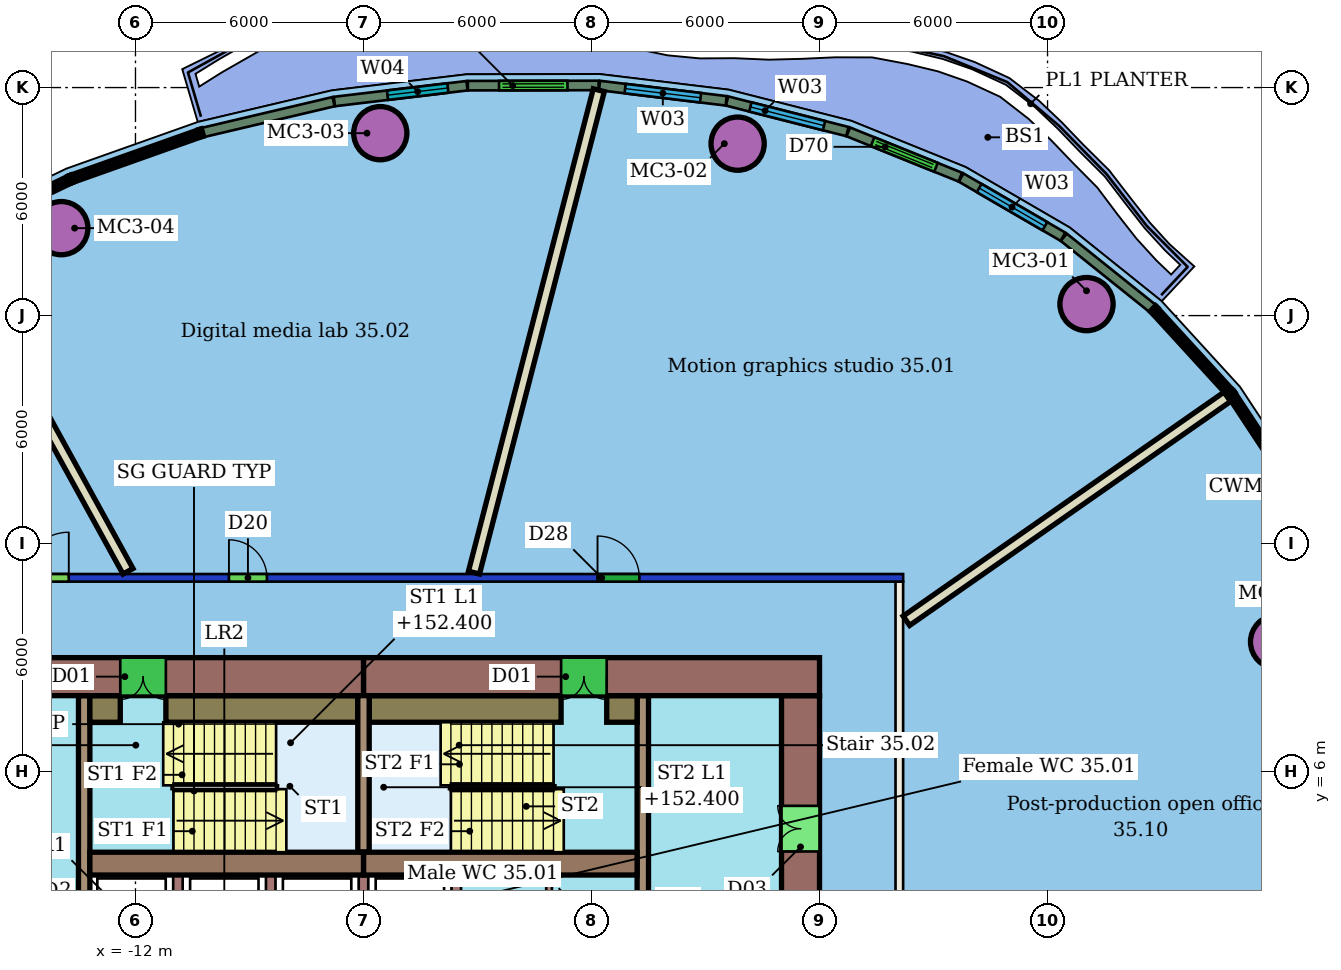
"""IFC4 building model, lengths in metres.
Left out: names, types, materials, properties, quantities, classifications, styles, units other than length and angle.
Written with IfcOpenShell. Run it as: python <this file> out.ifc"""

import sys

from ifc_helpers import new_model, si_unit, direction, frame, frame_2d, origin, origin_2d, place, context, subcontext, project, spatial, rectangle, hollow_circle, extrude, element, fill, save


model = new_model("IFC4")
c1 = context("Model", 3, precision=1e-05, world=origin(), true_north=direction((0.0, 1.0)))
c2 = subcontext(c1, "Body", "Model", "MODEL_VIEW")
j1 = project(units=[si_unit("LENGTHUNIT", "METRE"), si_unit("PLANEANGLEUNIT", "RADIAN")], contexts=[c1])
p1 = place(None, origin())
s1 = spatial("IfcSite", under=j1, at=p1, CompositionType="ELEMENT")
p2 = place(p1, origin())
s2 = spatial("IfcBuilding", under=s1, at=p2, CompositionType="ELEMENT")
p3 = place(p2, frame((0.0, 0.0, 150.6)))
s3 = spatial("IfcBuildingStorey", under=s2, at=p3, CompositionType="ELEMENT", Elevation=150.6)
for number, where, z_axis, x_axis in (
    (1, (13.026, 18.303, 0.0), (0.0, 0.0, 1.0), (1.0, 0.0, 0.0)),
    (2, (3.845, 22.524, 0.0), (0.0, 0.0, 1.0), (1.0, 0.0, 0.0)),
    (3, (-5.558, 22.8, 0.0), (0.0, 0.0, 1.0), (1.0, 0.0, 0.0)),
    (4, (-13.952, 20.301, 0.0), (0.0, 0.0, 1.0), (1.0, 0.0, 0.0)),
    (5, (18.041, 9.417, 0.0), (0.0, 0.0, 1.0), (1.0, 0.0, 0.0)),
):
    element("IfcColumn", number, at=place(p3, frame(where, z_axis=z_axis, x_axis=x_axis)), inside=s3, PredefinedType="COLUMN", context=c2, shape_type="SweptSolid", body=[
        extrude(hollow_circle(Radius=0.7, WallThickness=0.05, at=origin_2d()), origin(), (0.0, 0.0, 1.0), 3.45),
    ])
p4 = place(p3, frame((-20.2, 11.1, 0.0), z_axis=(0.0, 0.0, 1.0), x_axis=(1.0, 0.0, 0.0)))
e6 = element("IfcWall", 6, at=p4, inside=s3, PredefinedType="PARTITIONING", context=c2, shape_type="SweptSolid", body=[
    extrude(rectangle(XDim=28.4, YDim=0.2, at=frame_2d((14.2, 0.0))), origin(), (0.0, 0.0, 1.0), 3.05),
])
p5 = place(p4, frame((20.358, 0.0, 0.0)))
e7 = element("IfcOpeningElement", 7, at=p5, cuts=e6, PredefinedType="OPENING", context=c2, shape_type="SweptSolid", body=[
    extrude(rectangle(XDim=1.1, YDim=2.1, at=frame_2d((0.55, 1.05))), frame((0.0, 0.11, 0.0), z_axis=(0.0, -1.0, 0.0), x_axis=(1.0, 0.0, 0.0)), (0.0, 0.0, 1.0), 0.22),
])
p6 = place(p4, frame((10.659, 0.0, 0.0)))
e8 = element("IfcOpeningElement", 8, at=p6, cuts=e6, PredefinedType="OPENING", context=c2, shape_type="SweptSolid", body=[
    extrude(rectangle(XDim=1.0, YDim=2.1, at=frame_2d((0.5, 1.05))), frame((0.0, 0.11, 0.0), z_axis=(0.0, -1.0, 0.0), x_axis=(1.0, 0.0, 0.0)), (0.0, 0.0, 1.0), 0.22),
])
p7 = place(p4, frame((5.245, 0.0, 0.0)))
e9 = element("IfcOpeningElement", 9, at=p7, cuts=e6, PredefinedType="OPENING", context=c2, shape_type="SweptSolid", body=[
    extrude(rectangle(XDim=1.2, YDim=2.1, at=frame_2d((0.6, 1.05))), frame((0.0, 0.11, 0.0), z_axis=(0.0, -1.0, 0.0), x_axis=(1.0, 0.0, 0.0)), (0.0, 0.0, 1.0), 0.22),
])
p8 = place(p3, frame((8.1, 11.0, 0.0), z_axis=(0.0, 0.0, 1.0), x_axis=(0.0, -1.0, 0.0)))
e10 = element("IfcWall", 10, at=p8, inside=s3, PredefinedType="PARTITIONING", context=c2, shape_type="SweptSolid", body=[
    extrude(rectangle(XDim=22.0, YDim=0.2, at=frame_2d((11.0, 0.0))), origin(), (0.0, 0.0, 1.0), 3.45),
])
p9 = place(p8, frame((16.014, 0.0, 0.0)))
e11 = element("IfcOpeningElement", 11, at=p9, cuts=e10, PredefinedType="OPENING", context=c2, shape_type="SweptSolid", body=[
    extrude(rectangle(XDim=1.2, YDim=2.1, at=frame_2d((0.6, 1.05))), frame((0.0, 0.11, 0.0), z_axis=(0.0, -1.0, 0.0), x_axis=(1.0, 0.0, 0.0)), (0.0, 0.0, 1.0), 0.22),
])
p10 = place(p8, frame((8.381, 0.0, 0.0)))
e12 = element("IfcOpeningElement", 12, at=p10, cuts=e10, PredefinedType="OPENING", context=c2, shape_type="SweptSolid", body=[
    extrude(rectangle(XDim=1.8, YDim=2.1, at=frame_2d((0.9, 1.05))), frame((0.0, 0.11, 0.0), z_axis=(0.0, -1.0, 0.0), x_axis=(1.0, 0.0, 0.0)), (0.0, 0.0, 1.0), 0.22),
])
p11 = place(p3, frame((16.731, 15.864, 0.0), z_axis=(0.0, 0.0, 1.0), x_axis=(-0.820033028479, -0.572316199494, 0.0)))
e13 = element("IfcWall", 13, at=p11, inside=s3, PredefinedType="PARTITIONING", context=c2, shape_type="SweptSolid", body=[
    extrude(rectangle(XDim=10.298, YDim=0.3, at=frame_2d((5.149, 0.0))), origin(), (0.0, 0.0, 1.0), 3.45),
])
p12 = place(p3, frame((0.192, 23.931, 0.0), z_axis=(0.0, 0.0, 1.0), x_axis=(-0.25047941352, -0.968121925897, 0.0)))
e14 = element("IfcWall", 14, at=p12, inside=s3, PredefinedType="PARTITIONING", context=c2, shape_type="SweptSolid", body=[
    extrude(rectangle(XDim=13.112, YDim=0.3, at=frame_2d((6.556, 0.0))), origin(), (0.0, 0.0, 1.0), 3.45),
])
p13 = place(p3, frame((-16.937, 19.894, 0.0), z_axis=(0.0, 0.0, 1.0), x_axis=(0.48175299215, -0.87630705495, 0.0)))
e15 = element("IfcWall", 15, at=p13, inside=s3, PredefinedType="PARTITIONING", context=c2, shape_type="SweptSolid", body=[
    extrude(rectangle(XDim=9.839, YDim=0.3, at=frame_2d((4.919, 0.0))), origin(), (0.0, 0.0, 1.0), 3.45),
])
p14 = place(p3, frame((14.758, 18.194, 0.0), z_axis=(0.0, 0.0, 1.0), x_axis=(-0.780485864534, 0.625173428148, 0.0)))
e16 = element("IfcWall", 16, at=p14, inside=s3, PredefinedType="SOLIDWALL", context=c2, shape_type="SweptSolid", body=[
    extrude(rectangle(XDim=2.987, YDim=0.25, at=frame_2d((1.493, 0.0))), origin(), (0.0, 0.0, 1.0), 3.1),
])
p15 = place(p3, frame((12.405, 20.076, 0.0), z_axis=(0.0, 0.0, 1.0), x_axis=(-0.864615512978, 0.502434089925, 0.0)))
e17 = element("IfcWall", 17, at=p15, inside=s3, PredefinedType="SOLIDWALL", context=c2, shape_type="SweptSolid", body=[
    extrude(rectangle(XDim=3.097, YDim=0.25, at=frame_2d((1.548, 0.0))), origin(), (0.0, 0.0, 1.0), 3.1),
])
p16 = place(p15, frame((0.548, 0.0, 0.9)))
e18 = element("IfcOpeningElement", 18, at=p16, cuts=e17, PredefinedType="OPENING", context=c2, shape_type="SweptSolid", body=[
    extrude(rectangle(XDim=2.0, YDim=2.1, at=frame_2d((1.0, 1.05))), frame((0.0, 0.135, 0.0), z_axis=(0.0, -1.0, 0.0), x_axis=(1.0, 0.0, 0.0)), (0.0, 0.0, 1.0), 0.27),
])
p17 = place(p3, frame((9.704, 21.643, 0.0), z_axis=(0.0, 0.0, 1.0), x_axis=(-0.927146406079, 0.374699268339, 0.0)))
e19 = element("IfcWall", 19, at=p17, inside=s3, PredefinedType="SOLIDWALL", context=c2, shape_type="SweptSolid", body=[
    extrude(rectangle(XDim=3.178, YDim=0.25, at=frame_2d((1.589, 0.0))), origin(), (0.0, 0.0, 1.0), 3.1),
])
p18 = place(p17, frame((0.689, 0.0, 0.0)))
e20 = element("IfcOpeningElement", 20, at=p18, cuts=e19, PredefinedType="OPENING", context=c2, shape_type="SweptSolid", body=[
    extrude(rectangle(XDim=1.8, YDim=2.4, at=frame_2d((0.9, 1.2))), frame((0.0, 0.135, 0.0), z_axis=(0.0, -1.0, 0.0), x_axis=(1.0, 0.0, 0.0)), (0.0, 0.0, 1.0), 0.27),
])
p19 = place(p3, frame((6.733, 22.842, 0.0), z_axis=(0.0, 0.0, 1.0), x_axis=(-0.969199069112, 0.246278631701, 0.0)))
e21 = element("IfcWall", 21, at=p19, inside=s3, PredefinedType="SOLIDWALL", context=c2, shape_type="SweptSolid", body=[
    extrude(rectangle(XDim=3.267, YDim=0.25, at=frame_2d((1.634, 0.0))), origin(), (0.0, 0.0, 1.0), 3.1),
])
p20 = place(p19, frame((0.634, 0.0, 0.9)))
e22 = element("IfcOpeningElement", 22, at=p20, cuts=e21, PredefinedType="OPENING", context=c2, shape_type="SweptSolid", body=[
    extrude(rectangle(XDim=2.0, YDim=2.1, at=frame_2d((1.0, 1.05))), frame((0.0, 0.135, 0.0), z_axis=(0.0, -1.0, 0.0), x_axis=(1.0, 0.0, 0.0)), (0.0, 0.0, 1.0), 0.27),
])
p21 = place(p3, frame((3.543, 23.651, 0.0), z_axis=(0.0, 0.0, 1.0), x_axis=(-0.992754830244, 0.120157592466, 0.0)))
e23 = element("IfcWall", 23, at=p21, inside=s3, PredefinedType="SOLIDWALL", context=c2, shape_type="SweptSolid", body=[
    extrude(rectangle(XDim=3.357, YDim=0.25, at=frame_2d((1.678, 0.0))), origin(), (0.0, 0.0, 1.0), 3.1),
])
p22 = place(p21, frame((0.678, 0.0, 0.9)))
e24 = element("IfcOpeningElement", 24, at=p22, cuts=e23, PredefinedType="OPENING", context=c2, shape_type="SweptSolid", body=[
    extrude(rectangle(XDim=2.0, YDim=2.1, at=frame_2d((1.0, 1.05))), frame((0.0, 0.135, 0.0), z_axis=(0.0, -1.0, 0.0), x_axis=(1.0, 0.0, 0.0)), (0.0, 0.0, 1.0), 0.27),
])
p23 = place(p3, frame((0.187, 24.056, 0.0), z_axis=(0.0, 0.0, 1.0), x_axis=(-0.999998549944, -0.001702970638, 0.0)))
e25 = element("IfcWall", 25, at=p23, inside=s3, PredefinedType="SOLIDWALL", context=c2, shape_type="SweptSolid", body=[
    extrude(rectangle(XDim=3.441, YDim=0.25, at=frame_2d((1.72, 0.0))), origin(), (0.0, 0.0, 1.0), 3.1),
])
p24 = place(p23, frame((0.82, 0.0, 0.0)))
e26 = element("IfcOpeningElement", 26, at=p24, cuts=e25, PredefinedType="OPENING", context=c2, shape_type="SweptSolid", body=[
    extrude(rectangle(XDim=1.8, YDim=2.4, at=frame_2d((0.9, 1.2))), frame((0.0, 0.135, 0.0), z_axis=(0.0, -1.0, 0.0), x_axis=(1.0, 0.0, 0.0)), (0.0, 0.0, 1.0), 0.27),
])
p25 = place(p3, frame((-3.276, 24.049, 0.0), z_axis=(0.0, 0.0, 1.0), x_axis=(-0.992969234445, -0.11837271411, 0.0)))
e27 = element("IfcWall", 27, at=p25, inside=s3, PredefinedType="SOLIDWALL", context=c2, shape_type="SweptSolid", body=[
    extrude(rectangle(XDim=3.514, YDim=0.25, at=frame_2d((1.757, 0.0))), origin(), (0.0, 0.0, 1.0), 3.1),
])
p26 = place(p25, frame((0.507, 0.0, 0.9)))
e28 = element("IfcOpeningElement", 28, at=p26, cuts=e27, PredefinedType="OPENING", context=c2, shape_type="SweptSolid", body=[
    extrude(rectangle(XDim=1.6, YDim=2.1, at=frame_2d((0.8, 1.05))), frame((0.0, 0.135, 0.0), z_axis=(0.0, -1.0, 0.0), x_axis=(1.0, 0.0, 0.0)), (0.0, 0.0, 1.0), 0.27),
])
p27 = place(p3, frame((-6.787, 23.629, 0.0), z_axis=(0.0, 0.0, 1.0), x_axis=(-0.973349080419, -0.229328514683, 0.0)))
e29 = element("IfcWall", 29, at=p27, inside=s3, PredefinedType="SOLIDWALL", context=c2, shape_type="SweptSolid", body=[
    extrude(rectangle(XDim=3.529, YDim=0.25, at=frame_2d((1.765, 0.0))), origin(), (0.0, 0.0, 1.0), 3.1),
])
p28 = place(p3, frame((6.0, 8.5, 0.0), z_axis=(0.0, 0.0, 1.0), x_axis=(-1.0, 0.0, 0.0)))
e30 = element("IfcWall", 30, at=p28, inside=s3, PredefinedType="SHEAR", context=c2, shape_type="SweptSolid", body=[
    extrude(rectangle(XDim=12.0, YDim=1.0, at=frame_2d((6.0, 0.0))), origin(), (0.0, 0.0, 1.0), 3.3),
])
p29 = place(p28, frame((5.6, 0.0, 0.0)))
e31 = element("IfcOpeningElement", 31, at=p29, cuts=e30, PredefinedType="OPENING", context=c2, shape_type="SweptSolid", body=[
    extrude(rectangle(XDim=1.2, YDim=2.1, at=frame_2d((0.6, 1.05))), frame((0.0, 0.51, 0.0), z_axis=(0.0, -1.0, 0.0), x_axis=(1.0, 0.0, 0.0)), (0.0, 0.0, 1.0), 1.02),
])
p30 = place(p3, frame((-6.0, 8.5, 0.0), z_axis=(0.0, 0.0, 1.0), x_axis=(-1.0, 0.0, 0.0)))
e32 = element("IfcWall", 32, at=p30, inside=s3, PredefinedType="SHEAR", context=c2, shape_type="SweptSolid", body=[
    extrude(rectangle(XDim=12.0, YDim=1.0, at=frame_2d((6.0, 0.0))), origin(), (0.0, 0.0, 1.0), 3.3),
])
p31 = place(p30, frame((5.2, 0.0, 0.0)))
e33 = element("IfcOpeningElement", 33, at=p31, cuts=e32, PredefinedType="OPENING", context=c2, shape_type="SweptSolid", body=[
    extrude(rectangle(XDim=1.2, YDim=2.1, at=frame_2d((0.6, 1.05))), frame((0.0, 0.51, 0.0), z_axis=(0.0, -1.0, 0.0), x_axis=(1.0, 0.0, 0.0)), (0.0, 0.0, 1.0), 1.02),
])
p32 = place(p3, frame((5.5, -8.0, 0.0), z_axis=(0.0, 0.0, 1.0), x_axis=(0.0, 1.0, 0.0)))
e34 = element("IfcWall", 34, at=p32, inside=s3, PredefinedType="SHEAR", context=c2, shape_type="SweptSolid", body=[
    extrude(rectangle(XDim=16.0, YDim=1.0, at=frame_2d((8.0, 0.0))), origin(), (0.0, 0.0, 1.0), 3.3),
])
p33 = place(p32, frame((2.9, 0.0, 0.0)))
e35 = element("IfcOpeningElement", 35, at=p33, cuts=e34, PredefinedType="OPENING", context=c2, shape_type="SweptSolid", body=[
    extrude(rectangle(XDim=1.2, YDim=2.1, at=frame_2d((0.6, 1.05))), frame((0.0, 0.51, 0.0), z_axis=(0.0, -1.0, 0.0), x_axis=(1.0, 0.0, 0.0)), (0.0, 0.0, 1.0), 1.02),
])
p34 = place(p32, frame((11.9, 0.0, 0.0)))
e36 = element("IfcOpeningElement", 36, at=p34, cuts=e34, PredefinedType="OPENING", context=c2, shape_type="SweptSolid", body=[
    extrude(rectangle(XDim=1.2, YDim=2.1, at=frame_2d((0.6, 1.05))), frame((0.0, 0.51, 0.0), z_axis=(0.0, -1.0, 0.0), x_axis=(1.0, 0.0, 0.0)), (0.0, 0.0, 1.0), 1.02),
])
for number, where, z_axis, x_axis in (
    (37, (-13.2, 3.58, 0.0), (0.0, 0.0, 1.0), (1.0, 0.0, 0.0)),
    (38, (-6.0, 3.58, 0.0), (0.0, 0.0, 1.0), (1.0, 0.0, 0.0)),
):
    element("IfcWall", number, at=place(p3, frame(where, z_axis=z_axis, x_axis=x_axis)), inside=s3, PredefinedType="SHEAR", context=c2, shape_type="SweptSolid", body=[
        extrude(rectangle(XDim=7.2, YDim=0.6, at=frame_2d((3.6, 0.0))), origin(), (0.0, 0.0, 1.0), 3.3),
    ])
p35 = place(p3, frame((-13.35, 8.0, 0.0), z_axis=(0.0, 0.0, 1.0), x_axis=(0.0, -1.0, 0.0)))
e39 = element("IfcWall", 39, at=p35, inside=s3, PredefinedType="SHEAR", context=c2, shape_type="SweptSolid", body=[
    extrude(rectangle(XDim=16.0, YDim=0.3, at=frame_2d((8.0, 0.0))), origin(), (0.0, 0.0, 1.0), 3.3),
])
p36 = place(p35, frame((7.25, 0.0, 0.0)))
e40 = element("IfcOpeningElement", 40, at=p36, cuts=e39, PredefinedType="OPENING", context=c2, shape_type="SweptSolid", body=[
    extrude(rectangle(XDim=1.5, YDim=2.1, at=frame_2d((0.75, 1.05))), frame((0.0, 0.16, 0.0), z_axis=(0.0, -1.0, 0.0), x_axis=(1.0, 0.0, 0.0)), (0.0, 0.0, 1.0), 0.32),
])
p37 = place(p3, frame((1.35, -8.0, 0.0), z_axis=(0.0, 0.0, 1.0), x_axis=(0.0, 1.0, 0.0)))
e41 = element("IfcWall", 41, at=p37, inside=s3, PredefinedType="SHEAR", context=c2, shape_type="SweptSolid", body=[
    extrude(rectangle(XDim=16.0, YDim=0.3, at=frame_2d((8.0, 0.0))), origin(), (0.0, 0.0, 1.0), 3.3),
])
p38 = place(p37, frame((1.91, 0.0, 0.0)))
e42 = element("IfcOpeningElement", 42, at=p38, cuts=e41, PredefinedType="OPENING", context=c2, shape_type="SweptSolid", body=[
    extrude(rectangle(XDim=1.0, YDim=2.1, at=frame_2d((0.5, 1.05))), frame((0.0, 0.16, 0.0), z_axis=(0.0, -1.0, 0.0), x_axis=(1.0, 0.0, 0.0)), (0.0, 0.0, 1.0), 0.32),
])
p39 = place(p37, frame((7.25, 0.0, 0.0)))
e43 = element("IfcOpeningElement", 43, at=p39, cuts=e41, PredefinedType="OPENING", context=c2, shape_type="SweptSolid", body=[
    extrude(rectangle(XDim=1.5, YDim=2.1, at=frame_2d((0.75, 1.05))), frame((0.0, 0.16, 0.0), z_axis=(0.0, -1.0, 0.0), x_axis=(1.0, 0.0, 0.0)), (0.0, 0.0, 1.0), 0.32),
])
p40 = place(p3, frame((-6.0, 3.88, 0.0), z_axis=(0.0, 0.0, 1.0), x_axis=(0.0, 1.0, 0.0)))
e44 = element("IfcWall", 44, at=p40, inside=s3, PredefinedType="SHEAR", context=c2, shape_type="SweptSolid", body=[
    extrude(rectangle(XDim=4.12, YDim=0.3, at=frame_2d((2.06, 0.0))), origin(), (0.0, 0.0, 1.0), 3.3),
])
p41 = place(p3, frame((-13.2, 7.65, 0.0), z_axis=(0.0, 0.0, 1.0), x_axis=(1.0, 0.0, 0.0)))
e45 = element("IfcWall", 45, at=p41, inside=s3, PredefinedType="SHEAR", context=c2, shape_type="SweptSolid", body=[
    extrude(rectangle(XDim=0.8, YDim=0.7, at=frame_2d((0.4, 0.0))), origin(), (0.0, 0.0, 1.0), 3.3),
])
for number, where, z_axis, x_axis in (
    (46, (-11.2, 7.65, 0.0), (0.0, 0.0, 1.0), (1.0, 0.0, 0.0)),
    (47, (-5.85, 7.65, 0.0), (0.0, 0.0, 1.0), (1.0, 0.0, 0.0)),
):
    element("IfcWall", number, at=place(p3, frame(where, z_axis=z_axis, x_axis=x_axis)), inside=s3, PredefinedType="SHEAR", context=c2, shape_type="SweptSolid", body=[
        extrude(rectangle(XDim=5.05, YDim=0.7, at=frame_2d((2.525, 0.0))), origin(), (0.0, 0.0, 1.0), 3.3),
    ])
p42 = place(p3, frame((0.4, 7.65, 0.0), z_axis=(0.0, 0.0, 1.0), x_axis=(1.0, 0.0, 0.0)))
e48 = element("IfcWall", 48, at=p42, inside=s3, PredefinedType="SHEAR", context=c2, shape_type="SweptSolid", body=[
    extrude(rectangle(XDim=0.8, YDim=0.7, at=frame_2d((0.4, 0.0))), origin(), (0.0, 0.0, 1.0), 3.3),
])
for number, where, z_axis, x_axis in (
    (49, (-10.883, 1.6, 0.0), (0.0, 0.0, 1.0), (0.0, 1.0, 0.0)),
    (50, (-8.442, 1.6, 0.0), (0.0, 0.0, 1.0), (0.0, 1.0, 0.0)),
    (51, (-6.0, 1.6, 0.0), (0.0, 0.0, 1.0), (0.0, 1.0, 0.0)),
    (52, (-3.558, 1.6, 0.0), (0.0, 0.0, 1.0), (0.0, 1.0, 0.0)),
):
    element("IfcWall", number, at=place(p3, frame(where, z_axis=z_axis, x_axis=x_axis)), inside=s3, PredefinedType="SHEAR", context=c2, shape_type="SweptSolid", body=[
        extrude(rectangle(XDim=1.68, YDim=0.25, at=frame_2d((0.84, 0.0))), origin(), (0.0, 0.0, 1.0), 3.3),
    ])
p43 = place(p3, frame((-1.117, 1.6, 0.0), z_axis=(0.0, 0.0, 1.0), x_axis=(0.0, 1.0, 0.0)))
e53 = element("IfcWall", 53, at=p43, inside=s3, PredefinedType="PARTITIONING", context=c2, shape_type="SweptSolid", body=[
    extrude(rectangle(XDim=1.68, YDim=0.15, at=frame_2d((0.84, 0.0))), origin(), (0.0, 0.0, 1.0), 3.3),
])
p44 = place(p5, origin())
e54 = element("IfcDoor", 54, at=p44, inside=s3, OperationType="SINGLE_SWING_LEFT", PredefinedType="DOOR", context=c2, shape_type="SweptSolid", body=[
    extrude(rectangle(XDim=1.1, YDim=2.1, at=frame_2d((0.55, 1.05))), frame((0.0, 0.025, 0.0), z_axis=(0.0, -1.0, 0.0), x_axis=(1.0, 0.0, 0.0)), (0.0, 0.0, 1.0), 0.05),
])
fill(e7, e54)
p45 = place(p6, origin())
e55 = element("IfcDoor", 55, at=p45, inside=s3, OperationType="SINGLE_SWING_LEFT", PredefinedType="DOOR", context=c2, shape_type="SweptSolid", body=[
    extrude(rectangle(XDim=1.0, YDim=2.1, at=frame_2d((0.5, 1.05))), frame((0.0, 0.025, 0.0), z_axis=(0.0, -1.0, 0.0), x_axis=(1.0, 0.0, 0.0)), (0.0, 0.0, 1.0), 0.05),
])
fill(e8, e55)
p46 = place(p7, origin())
e56 = element("IfcDoor", 56, at=p46, inside=s3, OperationType="SINGLE_SWING_RIGHT", PredefinedType="DOOR", context=c2, shape_type="SweptSolid", body=[
    extrude(rectangle(XDim=1.2, YDim=2.1, at=frame_2d((0.6, 1.05))), frame((0.0, 0.025, 0.0), z_axis=(0.0, -1.0, 0.0), x_axis=(1.0, 0.0, 0.0)), (0.0, 0.0, 1.0), 0.05),
])
fill(e9, e56)
p47 = place(p16, origin())
e57 = element("IfcWindow", 57, at=p47, inside=s3, PartitioningType="SINGLE_PANEL", PredefinedType="WINDOW", context=c2, shape_type="SweptSolid", body=[
    extrude(rectangle(XDim=2.0, YDim=2.1, at=frame_2d((1.0, 1.05))), frame((0.0, 0.03, 0.0), z_axis=(0.0, -1.0, 0.0), x_axis=(1.0, 0.0, 0.0)), (0.0, 0.0, 1.0), 0.06),
])
fill(e18, e57)
p48 = place(p18, origin())
e58 = element("IfcDoor", 58, at=p48, inside=s3, OperationType="DOUBLE_DOOR_SLIDING", PredefinedType="DOOR", context=c2, shape_type="SweptSolid", body=[
    extrude(rectangle(XDim=1.8, YDim=2.4, at=frame_2d((0.9, 1.2))), frame((0.0, 0.025, 0.0), z_axis=(0.0, -1.0, 0.0), x_axis=(1.0, 0.0, 0.0)), (0.0, 0.0, 1.0), 0.05),
])
fill(e20, e58)
p49 = place(p20, origin())
e59 = element("IfcWindow", 59, at=p49, inside=s3, PartitioningType="SINGLE_PANEL", PredefinedType="WINDOW", context=c2, shape_type="SweptSolid", body=[
    extrude(rectangle(XDim=2.0, YDim=2.1, at=frame_2d((1.0, 1.05))), frame((0.0, 0.03, 0.0), z_axis=(0.0, -1.0, 0.0), x_axis=(1.0, 0.0, 0.0)), (0.0, 0.0, 1.0), 0.06),
])
fill(e22, e59)
p50 = place(p22, origin())
e60 = element("IfcWindow", 60, at=p50, inside=s3, PartitioningType="SINGLE_PANEL", PredefinedType="WINDOW", context=c2, shape_type="SweptSolid", body=[
    extrude(rectangle(XDim=2.0, YDim=2.1, at=frame_2d((1.0, 1.05))), frame((0.0, 0.03, 0.0), z_axis=(0.0, -1.0, 0.0), x_axis=(1.0, 0.0, 0.0)), (0.0, 0.0, 1.0), 0.06),
])
fill(e24, e60)
p51 = place(p24, origin())
e61 = element("IfcDoor", 61, at=p51, inside=s3, OperationType="DOUBLE_DOOR_SLIDING", PredefinedType="DOOR", context=c2, shape_type="SweptSolid", body=[
    extrude(rectangle(XDim=1.8, YDim=2.4, at=frame_2d((0.9, 1.2))), frame((0.0, 0.025, 0.0), z_axis=(0.0, -1.0, 0.0), x_axis=(1.0, 0.0, 0.0)), (0.0, 0.0, 1.0), 0.05),
])
fill(e26, e61)
p52 = place(p26, origin())
e62 = element("IfcWindow", 62, at=p52, inside=s3, PartitioningType="SINGLE_PANEL", PredefinedType="WINDOW", context=c2, shape_type="SweptSolid", body=[
    extrude(rectangle(XDim=1.6, YDim=2.1, at=frame_2d((0.8, 1.05))), frame((0.0, 0.03, 0.0), z_axis=(0.0, -1.0, 0.0), x_axis=(1.0, 0.0, 0.0)), (0.0, 0.0, 1.0), 0.06),
])
fill(e28, e62)
p53 = place(p29, origin())
e63 = element("IfcDoor", 63, at=p53, inside=s3, OperationType="DOUBLE_DOOR_SINGLE_SWING", PredefinedType="NOTDEFINED", context=c2, shape_type="SweptSolid", body=[
    extrude(rectangle(XDim=1.2, YDim=2.1, at=frame_2d((0.6, 1.05))), frame((0.0, 0.025, 0.0), z_axis=(0.0, -1.0, 0.0), x_axis=(1.0, 0.0, 0.0)), (0.0, 0.0, 1.0), 0.05),
])
fill(e31, e63)
p54 = place(p31, origin())
e64 = element("IfcDoor", 64, at=p54, inside=s3, OperationType="DOUBLE_DOOR_SINGLE_SWING", PredefinedType="NOTDEFINED", context=c2, shape_type="SweptSolid", body=[
    extrude(rectangle(XDim=1.2, YDim=2.1, at=frame_2d((0.6, 1.05))), frame((0.0, 0.025, 0.0), z_axis=(0.0, -1.0, 0.0), x_axis=(1.0, 0.0, 0.0)), (0.0, 0.0, 1.0), 0.05),
])
fill(e33, e64)
p55 = place(p34, origin())
e65 = element("IfcDoor", 65, at=p55, inside=s3, OperationType="DOUBLE_DOOR_SINGLE_SWING", PredefinedType="NOTDEFINED", context=c2, shape_type="SweptSolid", body=[
    extrude(rectangle(XDim=1.2, YDim=2.1, at=frame_2d((0.6, 1.05))), frame((0.0, 0.025, 0.0), z_axis=(0.0, -1.0, 0.0), x_axis=(1.0, 0.0, 0.0)), (0.0, 0.0, 1.0), 0.05),
])
fill(e36, e65)
save(model, sys.argv[1])
